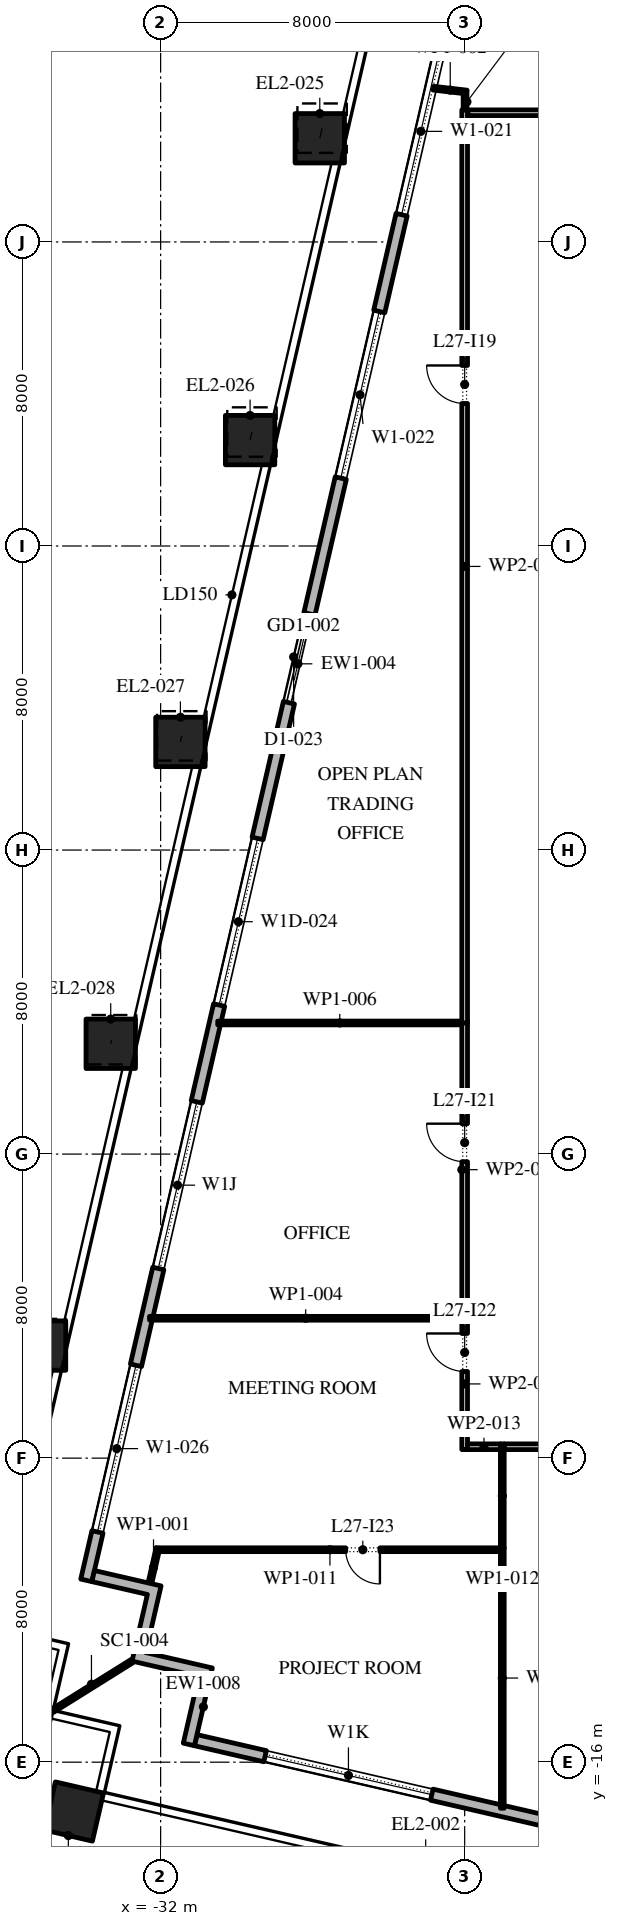
"""IFC4 building model, lengths in metres.
Left out: names, types, materials, properties, quantities, classifications, styles, units other than length and angle.
Written with IfcOpenShell. Run it as: python <this file> out.ifc"""

import sys

from ifc_helpers import new_model, si_unit, direction, frame, frame_2d, origin, origin_2d, place, context, subcontext, project, spatial, polyline, rectangle, outline, extrude, element, fill, save


model = new_model("IFC4")
c1 = context("Model", 3, precision=1e-05, world=origin(), true_north=direction((0.0, 1.0)))
c2 = subcontext(c1, "Body", "Model", "MODEL_VIEW")
j1 = project(units=[si_unit("LENGTHUNIT", "METRE"), si_unit("PLANEANGLEUNIT", "RADIAN")], contexts=[c1])
p1 = place(None, origin())
s1 = spatial("IfcSite", under=j1, at=p1, CompositionType="ELEMENT")
p2 = place(p1, origin())
s2 = spatial("IfcBuilding", under=s1, at=p2, CompositionType="ELEMENT")
p3 = place(p2, frame((0.0, 0.0, 126.6)))
s3 = spatial("IfcBuildingStorey", under=s2, at=p3, CompositionType="ELEMENT", Elevation=126.6)
p4 = place(p3, frame((-34.282, -17.298, 0.0), z_axis=(0.0, 0.0, 1.0), x_axis=(0.974370064785, -0.224951054344, 0.0)))
e1 = element("IfcColumn", 1, at=p4, inside=s3, PredefinedType="COLUMN", context=c2, shape_type="SweptSolid", body=[
    extrude(rectangle(XDim=1.3, YDim=1.3, at=origin_2d()), origin(), (0.0, 0.0, 1.0), 4.2),
])
p5 = place(p3, frame((-27.812, 26.728, 0.0), z_axis=(0.014559788571, 0.063169759976, 0.997896584813), x_axis=(-0.97445148511, 0.224598092528, 0.0)))
e2 = element("IfcColumn", 2, at=p5, inside=s3, PredefinedType="COLUMN", context=c2, shape_type="SweptSolid", body=[
    extrude(rectangle(XDim=1.3, YDim=1.3, at=origin_2d()), origin(), (0.0, 0.0, 1.0), 4.209),
])
p6 = place(p3, frame((-29.646, 18.786, 0.0), z_axis=(0.011668267153, 0.050562490995, 0.998652735462), x_axis=(-0.974391195695, 0.224859506699, 0.0)))
e3 = element("IfcColumn", 3, at=p6, inside=s3, PredefinedType="COLUMN", context=c2, shape_type="SweptSolid", body=[
    extrude(rectangle(XDim=1.3, YDim=1.3, at=origin_2d()), origin(), (0.0, 0.0, 1.0), 4.206),
])
p7 = place(p3, frame((-31.479, 10.844, 0.0), z_axis=(0.008770865357, 0.037987721479, 0.999239713451), x_axis=(-0.97436607968, 0.224968315033, 0.0)))
e4 = element("IfcColumn", 4, at=p7, inside=s3, PredefinedType="COLUMN", context=c2, shape_type="SweptSolid", body=[
    extrude(rectangle(XDim=1.3, YDim=1.3, at=origin_2d()), origin(), (0.0, 0.0, 1.0), 4.203),
])
p8 = place(p3, frame((-33.313, 2.903, 0.0), z_axis=(0.005869083212, 0.025335844359, 0.999661767226), x_axis=(-0.974202561131, 0.225675363932, 0.0)))
e5 = element("IfcColumn", 5, at=p8, inside=s3, PredefinedType="COLUMN", context=c2, shape_type="SweptSolid", body=[
    extrude(rectangle(XDim=1.3, YDim=1.3, at=origin_2d()), origin(), (0.0, 0.0, 1.0), 4.201),
])
p9 = place(p3, frame((-35.146, -5.039, 0.0), z_axis=(0.002906224189, 0.012671137464, 0.999915494498), x_axis=(-0.974691740237, 0.22355315143, 0.0)))
e6 = element("IfcColumn", 6, at=p9, inside=s3, PredefinedType="COLUMN", context=c2, shape_type="SweptSolid", body=[
    extrude(rectangle(XDim=1.3, YDim=1.3, at=origin_2d()), origin(), (0.0, 0.0, 1.0), 4.2),
])
p10 = place(p3, frame((-35.631, -15.139, 0.0), z_axis=(0.0, 0.0, 1.0), x_axis=(0.974370064785, -0.224951054344, 0.0)))
e7 = element("IfcColumn", 7, at=p10, inside=s3, PredefinedType="COLUMN", context=c2, shape_type="SweptSolid", body=[
    extrude(rectangle(XDim=1.3, YDim=1.3, at=origin_2d()), origin(), (0.0, 0.0, 1.0), 4.2),
])
p11 = place(p3, frame((-31.078, -15.421, 0.0), z_axis=(0.0, 0.0, 1.0), x_axis=(0.974370456532, -0.224949357493, 0.0)))
e8 = element("IfcWall", 8, at=p11, inside=s3, PredefinedType="STANDARD", context=c2, shape_type="SweptSolid", body=[
    extrude(rectangle(XDim=51.0, YDim=0.3, at=frame_2d((25.5, 0.0))), origin(), (0.0, 0.0, 1.0), 4.0),
])
p12 = place(p11, frame((1.875, 0.0, 0.45)))
e9 = element("IfcOpeningElement", 9, at=p12, cuts=e8, PredefinedType="OPENING", context=c2, shape_type="SweptSolid", body=[
    extrude(rectangle(XDim=4.5, YDim=2.65, at=frame_2d((2.25, 1.325))), frame((0.0, 0.16, 0.0), z_axis=(0.0, -1.0, 0.0), x_axis=(1.0, 0.0, 0.0)), (0.0, 0.0, 1.0), 0.32),
])
p13 = place(p11, frame((10.275, 0.0, 0.45)))
e10 = element("IfcOpeningElement", 10, at=p13, cuts=e8, PredefinedType="OPENING", context=c2, shape_type="SweptSolid", body=[
    extrude(rectangle(XDim=4.5, YDim=2.525, at=frame_2d((2.25, 1.262))), frame((0.0, 0.16, 0.0), z_axis=(0.0, -1.0, 0.0), x_axis=(1.0, 0.0, 0.0)), (0.0, 0.0, 1.0), 0.32),
])
p14 = place(p11, frame((18.825, 0.0, 0.45)))
e11 = element("IfcOpeningElement", 11, at=p14, cuts=e8, PredefinedType="OPENING", context=c2, shape_type="SweptSolid", body=[
    extrude(rectangle(XDim=4.5, YDim=2.5, at=frame_2d((2.25, 1.25))), frame((0.0, 0.16, 0.0), z_axis=(0.0, -1.0, 0.0), x_axis=(1.0, 0.0, 0.0)), (0.0, 0.0, 1.0), 0.32),
])
p15 = place(p11, frame((28.425, 0.0, 0.0)))
e12 = element("IfcOpeningElement", 12, at=p15, cuts=e8, PredefinedType="OPENING", context=c2, shape_type="SweptSolid", body=[
    extrude(rectangle(XDim=2.4, YDim=2.9, at=frame_2d((1.2, 1.45))), frame((0.0, 0.16, 0.0), z_axis=(0.0, -1.0, 0.0), x_axis=(1.0, 0.0, 0.0)), (0.0, 0.0, 1.0), 0.32),
])
p16 = place(p11, frame((35.925, 0.0, 0.45)))
e13 = element("IfcOpeningElement", 13, at=p16, cuts=e8, PredefinedType="OPENING", context=c2, shape_type="SweptSolid", body=[
    extrude(rectangle(XDim=4.5, YDim=2.45, at=frame_2d((2.25, 1.225))), frame((0.0, 0.16, 0.0), z_axis=(0.0, -1.0, 0.0), x_axis=(1.0, 0.0, 0.0)), (0.0, 0.0, 1.0), 0.32),
])
p17 = place(p11, frame((44.475, 0.0, 0.45)))
e14 = element("IfcOpeningElement", 14, at=p17, cuts=e8, PredefinedType="OPENING", context=c2, shape_type="SweptSolid", body=[
    extrude(rectangle(XDim=4.5, YDim=2.45, at=frame_2d((2.25, 1.225))), frame((0.0, 0.16, 0.0), z_axis=(0.0, -1.0, 0.0), x_axis=(1.0, 0.0, 0.0)), (0.0, 0.0, 1.0), 0.32),
])
p18 = place(p3, frame((-22.82, 37.016, 0.0), z_axis=(0.0, 0.0, 1.0), x_axis=(-0.224953880882, -0.974369412223, 0.0)))
e15 = element("IfcWall", 15, at=p18, inside=s3, PredefinedType="STANDARD", context=c2, shape_type="SweptSolid", body=[
    extrude(rectangle(XDim=49.5, YDim=0.3, at=frame_2d((24.75, 0.0))), origin(), (0.0, 0.0, 1.0), 4.0),
])
p19 = place(p18, frame((1.157, 0.0, 0.45)))
e16 = element("IfcOpeningElement", 16, at=p19, cuts=e15, PredefinedType="OPENING", context=c2, shape_type="SweptSolid", body=[
    extrude(rectangle(XDim=4.5, YDim=3.05, at=frame_2d((2.25, 1.525))), frame((0.0, 0.16, 0.0), z_axis=(0.0, -1.0, 0.0), x_axis=(1.0, 0.0, 0.0)), (0.0, 0.0, 1.0), 0.32),
])
p20 = place(p18, frame((8.121, 0.0, 0.45)))
e17 = element("IfcOpeningElement", 17, at=p20, cuts=e15, PredefinedType="OPENING", context=c2, shape_type="SweptSolid", body=[
    extrude(rectangle(XDim=4.5, YDim=3.05, at=frame_2d((2.25, 1.525))), frame((0.0, 0.16, 0.0), z_axis=(0.0, -1.0, 0.0), x_axis=(1.0, 0.0, 0.0)), (0.0, 0.0, 1.0), 0.32),
])
p21 = place(p18, frame((15.236, 0.0, 0.45)))
e18 = element("IfcOpeningElement", 18, at=p21, cuts=e15, PredefinedType="OPENING", context=c2, shape_type="SweptSolid", body=[
    extrude(rectangle(XDim=4.5, YDim=3.05, at=frame_2d((2.25, 1.525))), frame((0.0, 0.16, 0.0), z_axis=(0.0, -1.0, 0.0), x_axis=(1.0, 0.0, 0.0)), (0.0, 0.0, 1.0), 0.32),
])
p22 = place(p18, frame((23.4, 0.0, 0.0)))
e19 = element("IfcOpeningElement", 19, at=p22, cuts=e15, PredefinedType="OPENING", context=c2, shape_type="SweptSolid", body=[
    extrude(rectangle(XDim=2.4, YDim=3.5, at=frame_2d((1.2, 1.75))), frame((0.0, 0.16, 0.0), z_axis=(0.0, -1.0, 0.0), x_axis=(1.0, 0.0, 0.0)), (0.0, 0.0, 1.0), 0.32),
])
p23 = place(p18, frame((29.464, 0.0, 0.45)))
e20 = element("IfcOpeningElement", 20, at=p23, cuts=e15, PredefinedType="OPENING", context=c2, shape_type="SweptSolid", body=[
    extrude(rectangle(XDim=4.5, YDim=2.875, at=frame_2d((2.25, 1.438))), frame((0.0, 0.16, 0.0), z_axis=(0.0, -1.0, 0.0), x_axis=(1.0, 0.0, 0.0)), (0.0, 0.0, 1.0), 0.32),
])
p24 = place(p18, frame((36.579, 0.0, 0.45)))
e21 = element("IfcOpeningElement", 21, at=p24, cuts=e15, PredefinedType="OPENING", context=c2, shape_type="SweptSolid", body=[
    extrude(rectangle(XDim=4.5, YDim=2.675, at=frame_2d((2.25, 1.337))), frame((0.0, 0.16, 0.0), z_axis=(0.0, -1.0, 0.0), x_axis=(1.0, 0.0, 0.0)), (0.0, 0.0, 1.0), 0.32),
])
p25 = place(p18, frame((43.693, 0.0, 0.45)))
e22 = element("IfcOpeningElement", 22, at=p25, cuts=e15, PredefinedType="OPENING", context=c2, shape_type="SweptSolid", body=[
    extrude(rectangle(XDim=4.5, YDim=3.05, at=frame_2d((2.25, 1.525))), frame((0.0, 0.16, 0.0), z_axis=(0.0, -1.0, 0.0), x_axis=(1.0, 0.0, 0.0)), (0.0, 0.0, 1.0), 0.32),
])
p26 = place(p3, origin())
e23 = element("IfcWall", 23, at=p26, inside=s3, PredefinedType="STANDARD", context=c2, shape_type="SweptSolid", body=[
    extrude(outline(polyline([(-32.393, -13.116), (-30.639, -13.521), (-31.111, -15.567), (-31.404, -15.5), (-30.999, -13.746), (-32.753, -13.341), (-32.348, -11.587), (-33.809, -11.25), (-33.742, -10.957), (-31.988, -11.362), (-32.393, -13.116)])), origin(), (0.0, 0.0, 1.0), 4.0),
])
p27 = place(p3, frame((-32.753, -13.341, -0.05), z_axis=(0.0, 0.0, 1.0), x_axis=(-0.848059759764, -0.529900598103, 0.0)))
e24 = element("IfcWall", 24, at=p27, inside=s3, PredefinedType="STANDARD", context=c2, shape_type="SweptSolid", body=[
    extrude(rectangle(XDim=2.455, YDim=0.1, at=frame_2d((1.228, 0.0))), origin(), (0.0, 0.0, 1.0), 4.05),
])
p28 = place(p3, frame((-32.069, -10.361, 0.0), z_axis=(0.0, 0.0, 1.0), x_axis=(-0.222987762652, -0.974821243976, 0.0)))
e25 = element("IfcWall", 25, at=p28, inside=s3, PredefinedType="PARTITIONING", context=c2, shape_type="SweptSolid", body=[
    extrude(rectangle(XDim=1.058, YDim=0.1, at=frame_2d((0.529, 0.0))), origin(), (0.0, 0.0, 1.0), 4.0),
])
p29 = place(p3, frame((-24.82, 28.045, 0.0), z_axis=(0.0, 0.0, 1.0), x_axis=(0.993501545499, -0.113818623659, 0.0)))
e26 = element("IfcWall", 26, at=p29, inside=s3, PredefinedType="PARTITIONING", context=c2, shape_type="SweptSolid", body=[
    extrude(rectangle(XDim=0.886, YDim=0.1, at=frame_2d((0.443, 0.0))), origin(), (0.0, 0.0, 1.0), 4.0),
])
p30 = place(p3, frame((-24.0, -7.775, 0.0), z_axis=(0.0, 0.0, 1.0), x_axis=(0.0, 1.0, 0.0)))
e27 = element("IfcWall", 27, at=p30, inside=s3, PredefinedType="PARTITIONING", context=c2, shape_type="SweptSolid", body=[
    extrude(rectangle(XDim=3.455, YDim=0.15, at=frame_2d((1.728, 0.0))), origin(), (0.0, 0.0, 1.0), 4.0),
])
p31 = place(p30, frame((2.055, 0.0, 0.0)))
e28 = element("IfcOpeningElement", 28, at=p31, cuts=e27, PredefinedType="OPENING", context=c2, shape_type="SweptSolid", body=[
    extrude(rectangle(XDim=1.0, YDim=2.1, at=frame_2d((0.5, 1.05))), frame((0.0, 0.085, 0.0), z_axis=(0.0, -1.0, 0.0), x_axis=(1.0, 0.0, 0.0)), (0.0, 0.0, 1.0), 0.17),
])
p32 = place(p3, frame((-24.075, -4.32, 0.0), z_axis=(0.0, 0.0, 1.0), x_axis=(-1.0, 0.0, 0.0)))
e29 = element("IfcWall", 29, at=p32, inside=s3, PredefinedType="PARTITIONING", context=c2, shape_type="SweptSolid", body=[
    extrude(rectangle(XDim=8.217, YDim=0.1, at=frame_2d((4.108, 0.0))), origin(), (0.0, 0.0, 1.0), 4.0),
])
p33 = place(p3, frame((-24.0, -4.32, 0.0), z_axis=(0.0, 0.0, 1.0), x_axis=(0.0, 1.0, 0.0)))
e30 = element("IfcWall", 30, at=p33, inside=s3, PredefinedType="PARTITIONING", context=c2, shape_type="SweptSolid", body=[
    extrude(rectangle(XDim=7.82, YDim=0.15, at=frame_2d((3.91, 0.0))), origin(), (0.0, 0.0, 1.0), 4.0),
])
p34 = place(p33, frame((4.12, 0.0, 0.0)))
e31 = element("IfcOpeningElement", 31, at=p34, cuts=e30, PredefinedType="OPENING", context=c2, shape_type="SweptSolid", body=[
    extrude(rectangle(XDim=1.0, YDim=2.1, at=frame_2d((0.5, 1.05))), frame((0.0, 0.085, 0.0), z_axis=(0.0, -1.0, 0.0), x_axis=(1.0, 0.0, 0.0)), (0.0, 0.0, 1.0), 0.17),
])
p35 = place(p3, frame((-24.075, 3.45, 0.0), z_axis=(0.0, 0.0, 1.0), x_axis=(-1.0, 0.0, 0.0)))
e32 = element("IfcWall", 32, at=p35, inside=s3, PredefinedType="PARTITIONING", context=c2, shape_type="SweptSolid", body=[
    extrude(rectangle(XDim=6.423, YDim=0.1, at=frame_2d((3.211, 0.0))), origin(), (0.0, 0.0, 1.0), 4.0),
])
p36 = place(p3, frame((-24.0, 3.45, 0.0), z_axis=(0.0, 0.0, 1.0), x_axis=(0.0, 1.0, 0.0)))
e33 = element("IfcWall", 33, at=p36, inside=s3, PredefinedType="PARTITIONING", context=c2, shape_type="SweptSolid", body=[
    extrude(rectangle(XDim=24.025, YDim=0.15, at=frame_2d((12.013, 0.0))), origin(), (0.0, 0.0, 1.0), 4.0),
])
p37 = place(p36, frame((16.3, 0.0, 0.0)))
e34 = element("IfcOpeningElement", 34, at=p37, cuts=e33, PredefinedType="OPENING", context=c2, shape_type="SweptSolid", body=[
    extrude(rectangle(XDim=1.0, YDim=2.1, at=frame_2d((0.5, 1.05))), frame((0.0, 0.085, 0.0), z_axis=(0.0, -1.0, 0.0), x_axis=(1.0, 0.0, 0.0)), (0.0, 0.0, 1.0), 0.17),
])
p38 = place(p3, frame((-23.99, 27.475, 0.0), z_axis=(0.0, 0.0, 1.0), x_axis=(0.0, 1.0, 0.0)))
e35 = element("IfcWall", 35, at=p38, inside=s3, PredefinedType="PARTITIONING", context=c2, shape_type="SweptSolid", body=[
    extrude(rectangle(XDim=0.425, YDim=0.1, at=frame_2d((0.212, 0.0))), origin(), (0.0, 0.0, 1.0), 4.0),
])
p39 = place(p3, frame((-23.915, 27.4, 0.0), z_axis=(0.0, 0.0, 1.0), x_axis=(1.0, 0.0, 0.0)))
e36 = element("IfcWall", 36, at=p39, inside=s3, PredefinedType="PARTITIONING", context=c2, shape_type="SweptSolid", body=[
    extrude(rectangle(XDim=9.295, YDim=0.15, at=frame_2d((4.647, 0.0))), origin(), (0.0, 0.0, 1.0), 4.0),
])
p40 = place(p39, frame((3.095, 0.0, 0.0)))
e37 = element("IfcOpeningElement", 37, at=p40, cuts=e36, PredefinedType="OPENING", context=c2, shape_type="SweptSolid", body=[
    extrude(rectangle(XDim=1.0, YDim=2.1, at=frame_2d((0.5, 1.05))), frame((0.0, 0.085, 0.0), z_axis=(0.0, -1.0, 0.0), x_axis=(1.0, 0.0, 0.0)), (0.0, 0.0, 1.0), 0.17),
])
p41 = place(p3, frame((-23.01, -17.212, 0.0), z_axis=(0.0, 0.0, 1.0), x_axis=(0.0, 1.0, 0.0)))
e38 = element("IfcWall", 38, at=p41, inside=s3, PredefinedType="PARTITIONING", context=c2, shape_type="SweptSolid", body=[
    extrude(rectangle(XDim=6.852, YDim=0.1, at=frame_2d((3.426, 0.0))), origin(), (0.0, 0.0, 1.0), 4.0),
])
p42 = place(p3, frame((-23.06, -10.41, 0.0), z_axis=(0.0, 0.0, 1.0), x_axis=(-1.0, 0.0, 0.0)))
e39 = element("IfcWall", 39, at=p42, inside=s3, PredefinedType="PARTITIONING", context=c2, shape_type="SweptSolid", body=[
    extrude(rectangle(XDim=8.97, YDim=0.1, at=frame_2d((4.485, 0.0))), origin(), (0.0, 0.0, 1.0), 4.0),
])
p43 = place(p42, frame((3.17, 0.0, 0.0)))
e40 = element("IfcOpeningElement", 40, at=p43, cuts=e39, PredefinedType="OPENING", context=c2, shape_type="SweptSolid", body=[
    extrude(rectangle(XDim=0.9, YDim=2.1, at=frame_2d((0.45, 1.05))), frame((0.0, 0.06, 0.0), z_axis=(0.0, -1.0, 0.0), x_axis=(1.0, 0.0, 0.0)), (0.0, 0.0, 1.0), 0.12),
])
p44 = place(p3, frame((-23.01, -10.36, 0.0), z_axis=(0.0, 0.0, 1.0), x_axis=(0.0, 1.0, 0.0)))
e41 = element("IfcWall", 41, at=p44, inside=s3, PredefinedType="PARTITIONING", context=c2, shape_type="SweptSolid", body=[
    extrude(rectangle(XDim=2.735, YDim=0.1, at=frame_2d((1.368, 0.0))), origin(), (0.0, 0.0, 1.0), 4.0),
])
p45 = place(p3, frame((-23.06, -7.7, 0.0), z_axis=(0.0, 0.0, 1.0), x_axis=(-1.0, 0.0, 0.0)))
e42 = element("IfcWall", 42, at=p45, inside=s3, PredefinedType="PARTITIONING", context=c2, shape_type="SweptSolid", body=[
    extrude(rectangle(XDim=0.865, YDim=0.15, at=frame_2d((0.433, 0.0))), origin(), (0.0, 0.0, 1.0), 4.0),
])
p46 = place(p3, frame((-14.72, -7.7, 0.0), z_axis=(0.0, 0.0, 1.0), x_axis=(-1.0, 0.0, 0.0)))
e43 = element("IfcWall", 43, at=p46, inside=s3, PredefinedType="PARTITIONING", context=c2, shape_type="SweptSolid", body=[
    extrude(rectangle(XDim=8.24, YDim=0.15, at=frame_2d((4.12, 0.0))), origin(), (0.0, 0.0, 1.0), 4.0),
])
p47 = place(p46, frame((5.39, 0.0, 0.0)))
e44 = element("IfcOpeningElement", 44, at=p47, cuts=e43, PredefinedType="OPENING", context=c2, shape_type="SweptSolid", body=[
    extrude(rectangle(XDim=1.0, YDim=2.1, at=frame_2d((0.5, 1.05))), frame((0.0, 0.085, 0.0), z_axis=(0.0, -1.0, 0.0), x_axis=(1.0, 0.0, 0.0)), (0.0, 0.0, 1.0), 0.17),
])
p48 = place(p12, origin())
e45 = element("IfcWindow", 45, at=p48, inside=s3, PartitioningType="DOUBLE_PANEL_VERTICAL", PredefinedType="WINDOW", context=c2, shape_type="SweptSolid", body=[
    extrude(rectangle(XDim=4.5, YDim=2.65, at=frame_2d((2.25, 1.325))), frame((0.0, 0.03, 0.0), z_axis=(0.0, -1.0, 0.0), x_axis=(1.0, 0.0, 0.0)), (0.0, 0.0, 1.0), 0.06),
])
fill(e9, e45)
p49 = place(p20, origin())
e46 = element("IfcWindow", 46, at=p49, inside=s3, PartitioningType="DOUBLE_PANEL_VERTICAL", PredefinedType="WINDOW", context=c2, shape_type="SweptSolid", body=[
    extrude(rectangle(XDim=4.5, YDim=3.05, at=frame_2d((2.25, 1.525))), frame((0.0, 0.03, 0.0), z_axis=(0.0, -1.0, 0.0), x_axis=(1.0, 0.0, 0.0)), (0.0, 0.0, 1.0), 0.06),
])
fill(e17, e46)
p50 = place(p21, origin())
e47 = element("IfcWindow", 47, at=p50, inside=s3, PartitioningType="DOUBLE_PANEL_VERTICAL", PredefinedType="WINDOW", context=c2, shape_type="SweptSolid", body=[
    extrude(rectangle(XDim=4.5, YDim=3.05, at=frame_2d((2.25, 1.525))), frame((0.0, 0.03, 0.0), z_axis=(0.0, -1.0, 0.0), x_axis=(1.0, 0.0, 0.0)), (0.0, 0.0, 1.0), 0.06),
])
fill(e18, e47)
p51 = place(p22, origin())
e48 = element("IfcDoor", 48, at=p51, inside=s3, OperationType="DOUBLE_DOOR_SLIDING", PredefinedType="DOOR", context=c2, shape_type="SweptSolid", body=[
    extrude(rectangle(XDim=2.4, YDim=3.5, at=frame_2d((1.2, 1.75))), frame((0.0, 0.025, 0.0), z_axis=(0.0, -1.0, 0.0), x_axis=(1.0, 0.0, 0.0)), (0.0, 0.0, 1.0), 0.05),
])
fill(e19, e48)
p52 = place(p23, origin())
e49 = element("IfcWindow", 49, at=p52, inside=s3, PartitioningType="DOUBLE_PANEL_VERTICAL", PredefinedType="WINDOW", context=c2, shape_type="SweptSolid", body=[
    extrude(rectangle(XDim=4.5, YDim=2.875, at=frame_2d((2.25, 1.438))), frame((0.0, 0.03, 0.0), z_axis=(0.0, -1.0, 0.0), x_axis=(1.0, 0.0, 0.0)), (0.0, 0.0, 1.0), 0.06),
])
fill(e20, e49)
p53 = place(p24, origin())
e50 = element("IfcWindow", 50, at=p53, inside=s3, PartitioningType="DOUBLE_PANEL_VERTICAL", PredefinedType="WINDOW", context=c2, shape_type="SweptSolid", body=[
    extrude(rectangle(XDim=4.5, YDim=2.675, at=frame_2d((2.25, 1.337))), frame((0.0, 0.03, 0.0), z_axis=(0.0, -1.0, 0.0), x_axis=(1.0, 0.0, 0.0)), (0.0, 0.0, 1.0), 0.06),
])
fill(e21, e50)
p54 = place(p25, origin())
e51 = element("IfcWindow", 51, at=p54, inside=s3, PartitioningType="DOUBLE_PANEL_VERTICAL", PredefinedType="WINDOW", context=c2, shape_type="SweptSolid", body=[
    extrude(rectangle(XDim=4.5, YDim=3.05, at=frame_2d((2.25, 1.525))), frame((0.0, 0.03, 0.0), z_axis=(0.0, -1.0, 0.0), x_axis=(1.0, 0.0, 0.0)), (0.0, 0.0, 1.0), 0.06),
])
fill(e22, e51)
p55 = place(p37, origin())
e52 = element("IfcDoor", 52, at=p55, inside=s3, OperationType="SINGLE_SWING_LEFT", PredefinedType="DOOR", context=c2, shape_type="SweptSolid", body=[
    extrude(rectangle(XDim=1.0, YDim=2.1, at=frame_2d((0.5, 1.05))), frame((0.0, 0.025, 0.0), z_axis=(0.0, -1.0, 0.0), x_axis=(1.0, 0.0, 0.0)), (0.0, 0.0, 1.0), 0.05),
])
fill(e34, e52)
p56 = place(p34, origin())
e53 = element("IfcDoor", 53, at=p56, inside=s3, OperationType="SINGLE_SWING_LEFT", PredefinedType="DOOR", context=c2, shape_type="SweptSolid", body=[
    extrude(rectangle(XDim=1.0, YDim=2.1, at=frame_2d((0.5, 1.05))), frame((0.0, 0.025, 0.0), z_axis=(0.0, -1.0, 0.0), x_axis=(1.0, 0.0, 0.0)), (0.0, 0.0, 1.0), 0.05),
])
fill(e31, e53)
p57 = place(p31, origin())
e54 = element("IfcDoor", 54, at=p57, inside=s3, OperationType="SINGLE_SWING_LEFT", PredefinedType="DOOR", context=c2, shape_type="SweptSolid", body=[
    extrude(rectangle(XDim=1.0, YDim=2.1, at=frame_2d((0.5, 1.05))), frame((0.0, 0.025, 0.0), z_axis=(0.0, -1.0, 0.0), x_axis=(1.0, 0.0, 0.0)), (0.0, 0.0, 1.0), 0.05),
])
fill(e28, e54)
p58 = place(p43, origin())
e55 = element("IfcDoor", 55, at=p58, inside=s3, OperationType="SINGLE_SWING_RIGHT", PredefinedType="DOOR", context=c2, shape_type="SweptSolid", body=[
    extrude(rectangle(XDim=0.9, YDim=2.1, at=frame_2d((0.45, 1.05))), frame((0.0, 0.025, 0.0), z_axis=(0.0, -1.0, 0.0), x_axis=(1.0, 0.0, 0.0)), (0.0, 0.0, 1.0), 0.05),
])
fill(e40, e55)
save(model, sys.argv[1])
